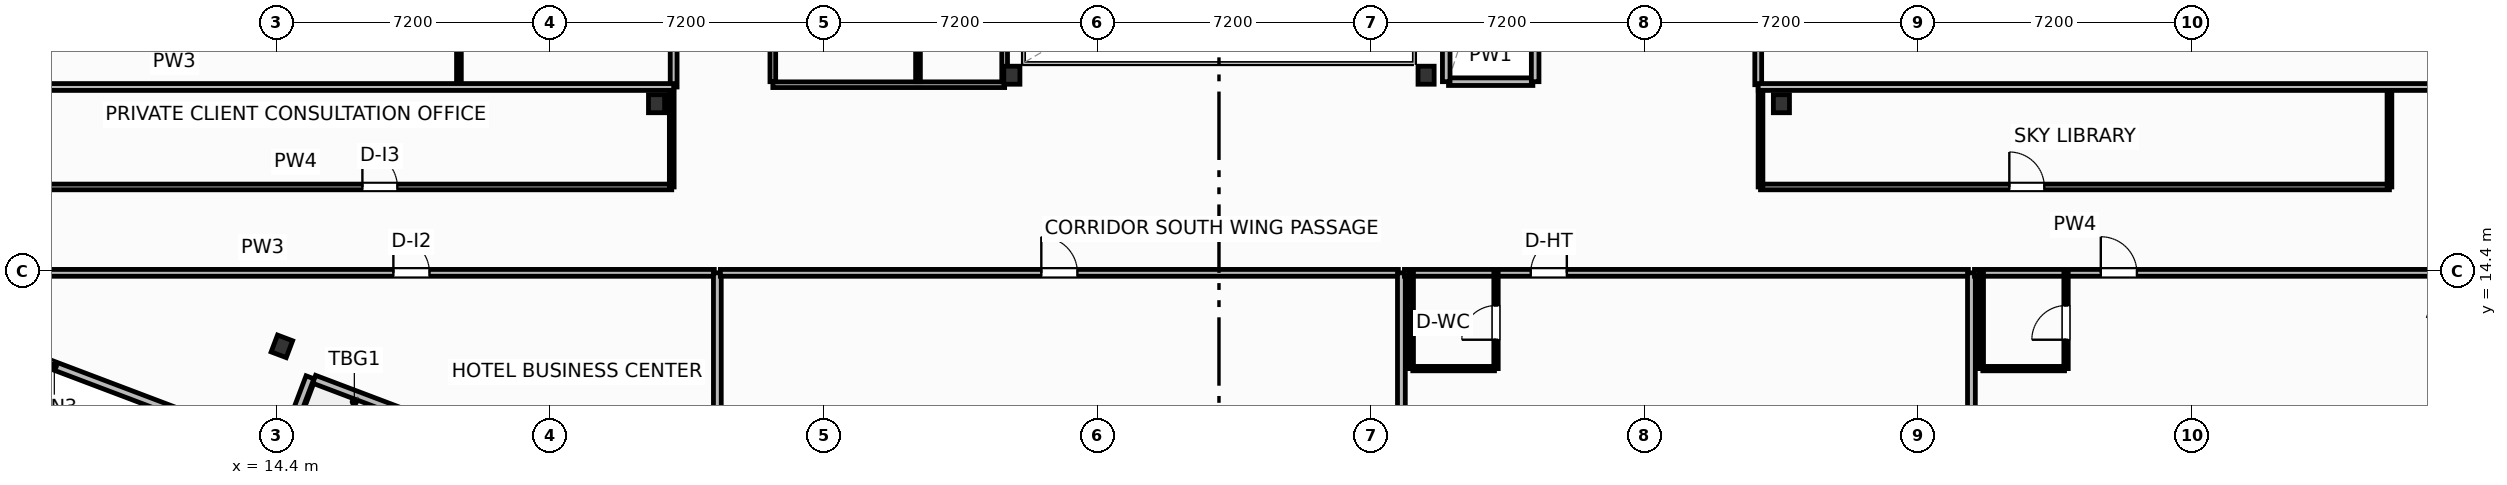
"""IFC4 building model, lengths in metres.
Left out: names, types, materials, properties, quantities, classifications, styles, units other than length and angle.
Written with IfcOpenShell. Run it as: python <this file> out.ifc"""

import sys

from ifc_helpers import new_model, si_unit, direction, frame, frame_2d, origin, origin_2d, place, context, subcontext, project, spatial, rectangle, i_section, extrude, element, fill, save


model = new_model("IFC4")
c1 = context("Model", 3, precision=1e-05, world=origin(), true_north=direction((0.0, 1.0)))
c2 = subcontext(c1, "Body", "Model", "MODEL_VIEW")
j1 = project(units=[si_unit("LENGTHUNIT", "METRE"), si_unit("PLANEANGLEUNIT", "RADIAN")], contexts=[c1])
p1 = place(None, origin())
s1 = spatial("IfcSite", under=j1, at=p1, CompositionType="ELEMENT")
p2 = place(p1, origin())
s2 = spatial("IfcBuilding", under=s1, at=p2, CompositionType="ELEMENT")
p3 = place(p2, frame((0.0, 0.0, 91.0)))
s3 = spatial("IfcBuildingStorey", under=s2, at=p3, CompositionType="ELEMENT", Elevation=91.0)
for number, where, z_axis, x_axis in (
    (1, (33.75, 19.55, 0.0), (0.0, 0.0, 1.0), (1.0, 0.0, 0.0)),
    (2, (44.65, 19.55, 0.0), (0.0, 0.0, 1.0), (1.0, 0.0, 0.0)),
    (3, (24.4, 18.8, 0.0), (0.0, 0.0, 1.0), (1.0, 0.0, 0.0)),
    (4, (54.0, 18.8, 0.0), (0.0, 0.0, 1.0), (1.0, 0.0, 0.0)),
    (5, (14.541, 12.416, 0.0), (0.0, 0.0, 1.0), (0.935, -0.354, 0.0)),
):
    element("IfcColumn", number, at=place(p3, frame(where, z_axis=z_axis, x_axis=x_axis)), inside=s3, PredefinedType="COLUMN", context=c2, shape_type="SweptSolid", body=[
        extrude(i_section(OverallWidth=0.424, OverallDepth=0.474, WebThickness=0.048, FlangeThickness=0.077, FilletRadius=0.025, at=origin_2d()), origin(), (0.0, 0.0, 1.0), 3.7),
    ])
p4 = place(p3, frame((21.0, 9.425, 0.0), z_axis=(0.0, 0.0, 1.0), x_axis=(-0.93521416643, 0.354082565101, 0.0)))
e6 = element("IfcWall", 6, at=p4, inside=s3, PredefinedType="SOLIDWALL", context=c2, shape_type="SweptSolid", body=[
    extrude(rectangle(XDim=6.0, YDim=0.22, at=frame_2d((3.0, 0.0))), origin(), (0.0, 0.0, 1.0), 2.73),
])
p5 = place(p4, frame((2.176, 0.0, 0.0)))
e7 = element("IfcOpeningElement", 7, at=p5, cuts=e6, PredefinedType="OPENING", context=c2, shape_type="SweptSolid", body=[
    extrude(rectangle(XDim=1.5, YDim=2.25, at=frame_2d((0.75, 1.125))), frame((0.0, 0.12, 0.0), z_axis=(0.0, -1.0, 0.0), x_axis=(1.0, 0.0, 0.0)), (0.0, 0.0, 1.0), 0.24),
])
p6 = place(p3, frame((1.026, 14.753, 0.0), z_axis=(0.0, 0.0, 1.0), x_axis=(0.935222448475, -0.354060689526, 0.0)))
e8 = element("IfcWall", 8, at=p6, inside=s3, PredefinedType="SOLIDWALL", context=c2, shape_type="SweptSolid", body=[
    extrude(rectangle(XDim=14.447, YDim=0.22, at=frame_2d((7.224, 0.0))), origin(), (0.0, 0.0, 1.0), 2.73),
])
p7 = place(p6, frame((6.399, 0.0, 0.8)))
e9 = element("IfcOpeningElement", 9, at=p7, cuts=e8, PredefinedType="OPENING", context=c2, shape_type="SweptSolid", body=[
    extrude(rectangle(XDim=1.65, YDim=1.65, at=frame_2d((0.825, 0.825))), frame((0.0, 0.12, 0.0), z_axis=(0.0, -1.0, 0.0), x_axis=(1.0, 0.0, 0.0)), (0.0, 0.0, 1.0), 0.24),
])
p8 = place(p3, frame((14.581, 9.755, 0.0), z_axis=(0.0, 0.0, 1.0), x_axis=(0.354061611705, 0.935222099352, 0.0)))
e10 = element("IfcWall", 10, at=p8, inside=s3, PredefinedType="SOLIDWALL", context=c2, shape_type="SweptSolid", body=[
    extrude(rectangle(XDim=1.975, YDim=0.22, at=frame_2d((0.987, 0.0))), origin(), (0.0, 0.0, 1.0), 2.73),
])
p9 = place(p3, frame((5.0, 16.61, 0.0), z_axis=(0.0, 0.0, 1.0), x_axis=(1.0, 0.0, 0.0)))
e11 = element("IfcWall", 11, at=p9, inside=s3, PredefinedType="PARTITIONING", context=c2, shape_type="SweptSolid", body=[
    extrude(rectangle(XDim=19.8, YDim=0.15, at=frame_2d((9.9, 0.0))), origin(), (0.0, 0.0, 1.0), 3.45),
])
p10 = place(p9, frame((11.66, 0.0, 0.0)))
e12 = element("IfcOpeningElement", 12, at=p10, cuts=e11, PredefinedType="OPENING", context=c2, shape_type="SweptSolid", body=[
    extrude(rectangle(XDim=0.92, YDim=2.05, at=frame_2d((0.46, 1.025))), frame((0.0, 0.085, 0.0), z_axis=(0.0, -1.0, 0.0), x_axis=(1.0, 0.0, 0.0)), (0.0, 0.0, 1.0), 0.17),
])
p11 = place(p3, frame((24.8, 16.61, 0.0), z_axis=(0.0, 0.0, 1.0), x_axis=(0.0, 1.0, 0.0)))
e13 = element("IfcWall", 13, at=p11, inside=s3, PredefinedType="PARTITIONING", context=c2, shape_type="SweptSolid", body=[
    extrude(rectangle(XDim=2.63, YDim=0.125, at=frame_2d((1.315, 0.0))), origin(), (0.0, 0.0, 1.0), 3.45),
])
p12 = place(p3, frame((53.45, 16.61, 0.0), z_axis=(0.0, 0.0, 1.0), x_axis=(1.0, 0.0, 0.0)))
e14 = element("IfcWall", 14, at=p12, inside=s3, PredefinedType="PARTITIONING", context=c2, shape_type="SweptSolid", body=[
    extrude(rectangle(XDim=16.55, YDim=0.15, at=frame_2d((8.275, 0.0))), origin(), (0.0, 0.0, 1.0), 2.58),
])
p13 = place(p12, frame((6.548, 0.0, 0.0)))
e15 = element("IfcOpeningElement", 15, at=p13, cuts=e14, PredefinedType="OPENING", context=c2, shape_type="SweptSolid", body=[
    extrude(rectangle(XDim=0.92, YDim=2.05, at=frame_2d((0.46, 1.025))), frame((0.0, 0.085, 0.0), z_axis=(0.0, -1.0, 0.0), x_axis=(1.0, 0.0, 0.0)), (0.0, 0.0, 1.0), 0.17),
])
p14 = place(p3, frame((53.45, 16.61, 0.0), z_axis=(0.0, 0.0, 1.0), x_axis=(0.0, 1.0, 0.0)))
e16 = element("IfcWall", 16, at=p14, inside=s3, PredefinedType="PARTITIONING", context=c2, shape_type="SweptSolid", body=[
    extrude(rectangle(XDim=2.63, YDim=0.125, at=frame_2d((1.315, 0.0))), origin(), (0.0, 0.0, 1.0), 2.58),
])
p15 = place(p3, frame((70.0, 16.61, 0.0), z_axis=(0.0, 0.0, 1.0), x_axis=(0.0, 1.0, 0.0)))
e17 = element("IfcWall", 17, at=p15, inside=s3, PredefinedType="PARTITIONING", context=c2, shape_type="SweptSolid", body=[
    extrude(rectangle(XDim=2.63, YDim=0.125, at=frame_2d((1.315, 0.0))), origin(), (0.0, 0.0, 1.0), 2.824),
])
p16 = place(p3, frame((2.146, 14.35, 0.0), z_axis=(0.0, 0.0, 1.0), x_axis=(1.0, 0.0, 0.0)))
e18 = element("IfcWall", 18, at=p16, inside=s3, PredefinedType="PARTITIONING", context=c2, shape_type="SweptSolid", body=[
    extrude(rectangle(XDim=23.774, YDim=0.18, at=frame_2d((11.887, 0.0))), origin(), (0.0, 0.0, 1.0), 3.45),
])
p17 = place(p16, frame((15.329, 0.0, 0.0)))
e19 = element("IfcOpeningElement", 19, at=p17, cuts=e18, PredefinedType="OPENING", context=c2, shape_type="SweptSolid", body=[
    extrude(rectangle(XDim=0.95, YDim=2.05, at=frame_2d((0.475, 1.025))), frame((0.0, 0.1, 0.0), z_axis=(0.0, -1.0, 0.0), x_axis=(1.0, 0.0, 0.0)), (0.0, 0.0, 1.0), 0.2),
])
p18 = place(p3, frame((26.0, 5.319, 0.0), z_axis=(0.0, 0.0, 1.0), x_axis=(0.0, 1.0, 0.0)))
e20 = element("IfcWall", 20, at=p18, inside=s3, PredefinedType="PARTITIONING", context=c2, shape_type="SweptSolid", body=[
    extrude(rectangle(XDim=9.031, YDim=0.205, at=frame_2d((4.515, 0.0))), origin(), (0.0, 0.0, 1.0), 3.45),
])
p19 = place(p3, frame((26.08, 14.35, 0.0), z_axis=(0.0, 0.0, 1.0), x_axis=(1.0, 0.0, 0.0)))
e21 = element("IfcWall", 21, at=p19, inside=s3, PredefinedType="PARTITIONING", context=c2, shape_type="SweptSolid", body=[
    extrude(rectangle(XDim=17.84, YDim=0.18, at=frame_2d((8.92, 0.0))), origin(), (0.0, 0.0, 1.0), 3.45),
])
p20 = place(p19, frame((8.445, 0.0, 0.0)))
e22 = element("IfcOpeningElement", 22, at=p20, cuts=e21, PredefinedType="OPENING", context=c2, shape_type="SweptSolid", body=[
    extrude(rectangle(XDim=0.95, YDim=2.05, at=frame_2d((0.475, 1.025))), frame((0.0, 0.1, 0.0), z_axis=(0.0, -1.0, 0.0), x_axis=(1.0, 0.0, 0.0)), (0.0, 0.0, 1.0), 0.2),
])
p21 = place(p3, frame((44.0, 0.75, 0.0), z_axis=(0.0, 0.0, 1.0), x_axis=(0.0, 1.0, 0.0)))
e23 = element("IfcWall", 23, at=p21, inside=s3, PredefinedType="PARTITIONING", context=c2, shape_type="SweptSolid", body=[
    extrude(rectangle(XDim=13.6, YDim=0.205, at=frame_2d((6.8, 0.0))), origin(), (0.0, 0.0, 1.0), 3.45),
])
p22 = place(p3, frame((44.08, 14.35, 0.0), z_axis=(0.0, 0.0, 1.0), x_axis=(1.0, 0.0, 0.0)))
e24 = element("IfcWall", 24, at=p22, inside=s3, PredefinedType="PARTITIONING", context=c2, shape_type="SweptSolid", body=[
    extrude(rectangle(XDim=14.84, YDim=0.18, at=frame_2d((7.42, 0.0))), origin(), (0.0, 0.0, 1.0), 3.45),
])
p23 = place(p22, frame((3.323, 0.0, 0.0)))
e25 = element("IfcOpeningElement", 25, at=p23, cuts=e24, PredefinedType="OPENING", context=c2, shape_type="SweptSolid", body=[
    extrude(rectangle(XDim=0.95, YDim=2.15, at=frame_2d((0.475, 1.075))), frame((0.0, 0.1, 0.0), z_axis=(0.0, -1.0, 0.0), x_axis=(1.0, 0.0, 0.0)), (0.0, 0.0, 1.0), 0.2),
])
p24 = place(p3, frame((44.3, 11.83, 0.0), z_axis=(0.0, 0.0, 1.0), x_axis=(1.0, 0.0, 0.0)))
e26 = element("IfcWall", 26, at=p24, inside=s3, PredefinedType="PARTITIONING", context=c2, shape_type="SweptSolid", body=[
    extrude(rectangle(XDim=2.15, YDim=0.115, at=frame_2d((1.075, 0.0))), origin(), (0.0, 0.0, 1.0), 3.45),
])
p25 = place(p3, frame((46.49, 11.83, 0.0), z_axis=(0.0, 0.0, 1.0), x_axis=(0.0, 1.0, 0.0)))
e27 = element("IfcWall", 27, at=p25, inside=s3, PredefinedType="PARTITIONING", context=c2, shape_type="SweptSolid", body=[
    extrude(rectangle(XDim=2.52, YDim=0.115, at=frame_2d((1.26, 0.0))), origin(), (0.0, 0.0, 1.0), 3.45),
])
p26 = place(p25, frame((0.76, 0.0, 0.0)))
e28 = element("IfcOpeningElement", 28, at=p26, cuts=e27, PredefinedType="OPENING", context=c2, shape_type="SweptSolid", body=[
    extrude(rectangle(XDim=0.9, YDim=2.05, at=frame_2d((0.45, 1.025))), frame((0.0, 0.067, 0.0), z_axis=(0.0, -1.0, 0.0), x_axis=(1.0, 0.0, 0.0)), (0.0, 0.0, 1.0), 0.135),
])
p27 = place(p3, frame((44.26, 11.83, 0.0), z_axis=(0.0, 0.0, 1.0), x_axis=(0.0, 1.0, 0.0)))
e29 = element("IfcWall", 29, at=p27, inside=s3, PredefinedType="PARTITIONING", context=c2, shape_type="SweptSolid", body=[
    extrude(rectangle(XDim=2.52, YDim=0.115, at=frame_2d((1.26, 0.0))), origin(), (0.0, 0.0, 1.0), 3.45),
])
p28 = place(p3, frame((59.0, -4.0, 0.0), z_axis=(0.0, 0.0, 1.0), x_axis=(0.0, 1.0, 0.0)))
e30 = element("IfcWall", 30, at=p28, inside=s3, PredefinedType="PARTITIONING", context=c2, shape_type="SweptSolid", body=[
    extrude(rectangle(XDim=18.35, YDim=0.205, at=frame_2d((9.175, 0.0))), origin(), (0.0, 0.0, 1.0), 3.45),
])
p29 = place(p3, frame((59.08, 14.35, 0.0), z_axis=(0.0, 0.0, 1.0), x_axis=(1.0, 0.0, 0.0)))
e31 = element("IfcWall", 31, at=p29, inside=s3, PredefinedType="PARTITIONING", context=c2, shape_type="SweptSolid", body=[
    extrude(rectangle(XDim=15.775, YDim=0.18, at=frame_2d((7.888, 0.0))), origin(), (0.0, 0.0, 1.0), 2.58),
])
p30 = place(p29, frame((3.324, 0.0, 0.0)))
e32 = element("IfcOpeningElement", 32, at=p30, cuts=e31, PredefinedType="OPENING", context=c2, shape_type="SweptSolid", body=[
    extrude(rectangle(XDim=0.95, YDim=2.15, at=frame_2d((0.475, 1.075))), frame((0.0, 0.1, 0.0), z_axis=(0.0, -1.0, 0.0), x_axis=(1.0, 0.0, 0.0)), (0.0, 0.0, 1.0), 0.2),
])
p31 = place(p3, frame((59.3, 11.83, 0.0), z_axis=(0.0, 0.0, 1.0), x_axis=(1.0, 0.0, 0.0)))
e33 = element("IfcWall", 33, at=p31, inside=s3, PredefinedType="PARTITIONING", context=c2, shape_type="SweptSolid", body=[
    extrude(rectangle(XDim=2.15, YDim=0.115, at=frame_2d((1.075, 0.0))), origin(), (0.0, 0.0, 1.0), 3.45),
])
p32 = place(p3, frame((61.49, 11.83, 0.0), z_axis=(0.0, 0.0, 1.0), x_axis=(0.0, 1.0, 0.0)))
e34 = element("IfcWall", 34, at=p32, inside=s3, PredefinedType="PARTITIONING", context=c2, shape_type="SweptSolid", body=[
    extrude(rectangle(XDim=2.52, YDim=0.115, at=frame_2d((1.26, 0.0))), origin(), (0.0, 0.0, 1.0), 3.45),
])
p33 = place(p32, frame((0.76, 0.0, 0.0)))
e35 = element("IfcOpeningElement", 35, at=p33, cuts=e34, PredefinedType="OPENING", context=c2, shape_type="SweptSolid", body=[
    extrude(rectangle(XDim=0.9, YDim=2.05, at=frame_2d((0.45, 1.025))), frame((0.0, 0.067, 0.0), z_axis=(0.0, -1.0, 0.0), x_axis=(1.0, 0.0, 0.0)), (0.0, 0.0, 1.0), 0.135),
])
p34 = place(p3, frame((59.26, 11.83, 0.0), z_axis=(0.0, 0.0, 1.0), x_axis=(0.0, 1.0, 0.0)))
e36 = element("IfcWall", 36, at=p34, inside=s3, PredefinedType="PARTITIONING", context=c2, shape_type="SweptSolid", body=[
    extrude(rectangle(XDim=2.52, YDim=0.115, at=frame_2d((1.26, 0.0))), origin(), (0.0, 0.0, 1.0), 3.45),
])
p35 = place(p3, frame((24.85, 19.24, 0.0), z_axis=(0.0, 0.0, 1.0), x_axis=(0.0, 1.0, 0.0)))
e37 = element("IfcWall", 37, at=p35, inside=s3, PredefinedType="PARTITIONING", context=c2, shape_type="SweptSolid", body=[
    extrude(rectangle(XDim=7.42, YDim=0.18, at=frame_2d((3.71, 0.0))), origin(), (0.0, 0.0, 1.0), 3.45),
])
p36 = place(p35, frame((2.4, 0.0, 0.0)))
e38 = element("IfcOpeningElement", 38, at=p36, cuts=e37, PredefinedType="OPENING", context=c2, shape_type="SweptSolid", body=[
    extrude(rectangle(XDim=0.92, YDim=2.05, at=frame_2d((0.46, 1.025))), frame((0.0, 0.1, 0.0), z_axis=(0.0, -1.0, 0.0), x_axis=(1.0, 0.0, 0.0)), (0.0, 0.0, 1.0), 0.2),
])
p37 = place(p3, frame((19.2, 19.24, 0.0), z_axis=(0.0, 0.0, 1.0), x_axis=(0.0, 1.0, 0.0)))
e39 = element("IfcWall", 39, at=p37, inside=s3, PredefinedType="PARTITIONING", context=c2, shape_type="SweptSolid", body=[
    extrude(rectangle(XDim=7.42, YDim=0.125, at=frame_2d((3.71, 0.0))), origin(), (0.0, 0.0, 1.0), 3.45),
])
p38 = place(p3, frame((-1.432, 19.24, 0.0), z_axis=(0.0, 0.0, 1.0), x_axis=(1.0, 0.0, 0.0)))
e40 = element("IfcWall", 40, at=p38, inside=s3, PredefinedType="PARTITIONING", context=c2, shape_type="SweptSolid", body=[
    extrude(rectangle(XDim=26.282, YDim=0.18, at=frame_2d((13.141, 0.0))), origin(), (0.0, 0.0, 1.0), 3.45),
])
p39 = place(p3, frame((53.39, 19.3, 0.0), z_axis=(0.0, 0.0, 1.0), x_axis=(0.0, 1.0, 0.0)))
e41 = element("IfcWall", 41, at=p39, inside=s3, PredefinedType="PARTITIONING", context=c2, shape_type="SweptSolid", body=[
    extrude(rectangle(XDim=8.07, YDim=0.18, at=frame_2d((4.035, 0.0))), origin(), (0.0, 0.0, 1.0), 3.45),
])
p40 = place(p39, frame((2.2, 0.0, 0.0)))
e42 = element("IfcOpeningElement", 42, at=p40, cuts=e41, PredefinedType="OPENING", context=c2, shape_type="SweptSolid", body=[
    extrude(rectangle(XDim=0.92, YDim=2.05, at=frame_2d((0.46, 1.025))), frame((0.0, 0.1, 0.0), z_axis=(0.0, -1.0, 0.0), x_axis=(1.0, 0.0, 0.0)), (0.0, 0.0, 1.0), 0.2),
])
p41 = place(p3, frame((53.39, 19.24, 0.0), z_axis=(0.0, 0.0, 1.0), x_axis=(1.0, 0.0, 0.0)))
e43 = element("IfcWall", 43, at=p41, inside=s3, PredefinedType="PARTITIONING", context=c2, shape_type="SweptSolid", body=[
    extrude(rectangle(XDim=23.317, YDim=0.18, at=frame_2d((11.658, 0.0))), origin(), (0.0, 0.0, 1.0), 3.45),
])
p42 = place(p3, frame((27.46, 19.3, 0.0), z_axis=(0.0, 0.0, 1.0), x_axis=(1.0, 0.0, 0.0)))
e44 = element("IfcWall", 44, at=p42, inside=s3, PredefinedType="PARTITIONING", context=c2, shape_type="SweptSolid", body=[
    extrude(rectangle(XDim=6.1, YDim=0.15, at=frame_2d((3.05, 0.0))), origin(), (0.0, 0.0, 1.0), 2.662),
])
p43 = place(p3, frame((31.28, 19.38, 0.0), z_axis=(0.0, 0.0, 1.0), x_axis=(0.0, 1.0, 0.0)))
e45 = element("IfcWall", 45, at=p43, inside=s3, PredefinedType="PARTITIONING", context=c2, shape_type="SweptSolid", body=[
    extrude(rectangle(XDim=7.16, YDim=0.125, at=frame_2d((3.58, 0.0))), origin(), (0.0, 0.0, 1.0), 3.45),
])
p44 = place(p3, frame((27.46, 19.38, 0.0), z_axis=(0.0, 0.0, 1.0), x_axis=(0.0, 1.0, 0.0)))
e46 = element("IfcWall", 46, at=p44, inside=s3, PredefinedType="PARTITIONING", context=c2, shape_type="SweptSolid", body=[
    extrude(rectangle(XDim=7.16, YDim=0.15, at=frame_2d((3.58, 0.0))), origin(), (0.0, 0.0, 1.0), 3.45),
])
p45 = place(p44, frame((1.4, 0.0, 0.0)))
e47 = element("IfcOpeningElement", 47, at=p45, cuts=e46, PredefinedType="OPENING", context=c2, shape_type="SweptSolid", body=[
    extrude(rectangle(XDim=0.95, YDim=2.05, at=frame_2d((0.475, 1.025))), frame((0.0, 0.085, 0.0), z_axis=(0.0, -1.0, 0.0), x_axis=(1.0, 0.0, 0.0)), (0.0, 0.0, 1.0), 0.17),
])
p46 = place(p3, frame((33.56, 19.38, 0.0), z_axis=(0.0, 0.0, 1.0), x_axis=(0.0, 1.0, 0.0)))
e48 = element("IfcWall", 48, at=p46, inside=s3, PredefinedType="PARTITIONING", context=c2, shape_type="SweptSolid", body=[
    extrude(rectangle(XDim=7.16, YDim=0.15, at=frame_2d((3.58, 0.0))), origin(), (0.0, 0.0, 1.0), 2.824),
])
p47 = place(p3, frame((45.24, 19.38, 0.0), z_axis=(0.0, 0.0, 1.0), x_axis=(1.0, 0.0, 0.0)))
e49 = element("IfcWall", 49, at=p47, inside=s3, PredefinedType="PARTITIONING", context=c2, shape_type="SweptSolid", body=[
    extrude(rectangle(XDim=2.22, YDim=0.2, at=frame_2d((1.11, 0.0))), origin(), (0.0, 0.0, 1.0), 2.662),
])
for number, where, z_axis, x_axis in (
    (50, (45.18, 19.38, 0.0), (0.0, 0.0, 1.0), (0.0, 1.0, 0.0)),
    (51, (47.52, 19.38, 0.0), (0.0, 0.0, 1.0), (0.0, 1.0, 0.0)),
):
    element("IfcWall", number, at=place(p3, frame(where, z_axis=z_axis, x_axis=x_axis)), inside=s3, PredefinedType="PARTITIONING", context=c2, shape_type="SweptSolid", body=[
        extrude(rectangle(XDim=6.9, YDim=0.2, at=frame_2d((3.45, 0.0))), origin(), (0.0, 0.0, 1.0), 3.45),
    ])
p48 = place(p7, origin())
e52 = element("IfcWindow", 52, at=p48, inside=s3, PartitioningType="SINGLE_PANEL", PredefinedType="WINDOW", context=c2, shape_type="SweptSolid", body=[
    extrude(rectangle(XDim=1.65, YDim=1.65, at=frame_2d((0.825, 0.825))), frame((0.0, 0.03, 0.0), z_axis=(0.0, -1.0, 0.0), x_axis=(1.0, 0.0, 0.0)), (0.0, 0.0, 1.0), 0.06),
])
fill(e9, e52)
p49 = place(p10, origin())
e53 = element("IfcDoor", 53, at=p49, inside=s3, OperationType="SINGLE_SWING_LEFT", PredefinedType="DOOR", context=c2, shape_type="SweptSolid", body=[
    extrude(rectangle(XDim=0.92, YDim=2.05, at=frame_2d((0.46, 1.025))), frame((0.0, 0.025, 0.0), z_axis=(0.0, -1.0, 0.0), x_axis=(1.0, 0.0, 0.0)), (0.0, 0.0, 1.0), 0.05),
])
fill(e12, e53)
p50 = place(p13, origin())
e54 = element("IfcDoor", 54, at=p50, inside=s3, OperationType="SINGLE_SWING_LEFT", PredefinedType="DOOR", context=c2, shape_type="SweptSolid", body=[
    extrude(rectangle(XDim=0.92, YDim=2.05, at=frame_2d((0.46, 1.025))), frame((0.0, 0.025, 0.0), z_axis=(0.0, -1.0, 0.0), x_axis=(1.0, 0.0, 0.0)), (0.0, 0.0, 1.0), 0.05),
])
fill(e15, e54)
p51 = place(p17, origin())
e55 = element("IfcDoor", 55, at=p51, inside=s3, OperationType="SINGLE_SWING_LEFT", PredefinedType="DOOR", context=c2, shape_type="SweptSolid", body=[
    extrude(rectangle(XDim=0.95, YDim=2.05, at=frame_2d((0.475, 1.025))), frame((0.0, 0.025, 0.0), z_axis=(0.0, -1.0, 0.0), x_axis=(1.0, 0.0, 0.0)), (0.0, 0.0, 1.0), 0.05),
])
fill(e19, e55)
p52 = place(p20, origin())
e56 = element("IfcDoor", 56, at=p52, inside=s3, OperationType="SINGLE_SWING_LEFT", PredefinedType="DOOR", context=c2, shape_type="SweptSolid", body=[
    extrude(rectangle(XDim=0.95, YDim=2.05, at=frame_2d((0.475, 1.025))), frame((0.0, 0.025, 0.0), z_axis=(0.0, -1.0, 0.0), x_axis=(1.0, 0.0, 0.0)), (0.0, 0.0, 1.0), 0.05),
])
fill(e22, e56)
p53 = place(p23, origin())
e57 = element("IfcDoor", 57, at=p53, inside=s3, OperationType="SINGLE_SWING_RIGHT", PredefinedType="DOOR", context=c2, shape_type="SweptSolid", body=[
    extrude(rectangle(XDim=0.95, YDim=2.15, at=frame_2d((0.475, 1.075))), frame((0.0, 0.025, 0.0), z_axis=(0.0, -1.0, 0.0), x_axis=(1.0, 0.0, 0.0)), (0.0, 0.0, 1.0), 0.05),
])
fill(e25, e57)
p54 = place(p26, origin())
e58 = element("IfcDoor", 58, at=p54, inside=s3, OperationType="SINGLE_SWING_LEFT", PredefinedType="DOOR", context=c2, shape_type="SweptSolid", body=[
    extrude(rectangle(XDim=0.9, YDim=2.05, at=frame_2d((0.45, 1.025))), frame((0.0, 0.025, 0.0), z_axis=(0.0, -1.0, 0.0), x_axis=(1.0, 0.0, 0.0)), (0.0, 0.0, 1.0), 0.05),
])
fill(e28, e58)
p55 = place(p30, origin())
e59 = element("IfcDoor", 59, at=p55, inside=s3, OperationType="SINGLE_SWING_LEFT", PredefinedType="DOOR", context=c2, shape_type="SweptSolid", body=[
    extrude(rectangle(XDim=0.95, YDim=2.15, at=frame_2d((0.475, 1.075))), frame((0.0, 0.025, 0.0), z_axis=(0.0, -1.0, 0.0), x_axis=(1.0, 0.0, 0.0)), (0.0, 0.0, 1.0), 0.05),
])
fill(e32, e59)
p56 = place(p33, origin())
e60 = element("IfcDoor", 60, at=p56, inside=s3, OperationType="SINGLE_SWING_LEFT", PredefinedType="DOOR", context=c2, shape_type="SweptSolid", body=[
    extrude(rectangle(XDim=0.9, YDim=2.05, at=frame_2d((0.45, 1.025))), frame((0.0, 0.025, 0.0), z_axis=(0.0, -1.0, 0.0), x_axis=(1.0, 0.0, 0.0)), (0.0, 0.0, 1.0), 0.05),
])
fill(e35, e60)
save(model, sys.argv[1])
